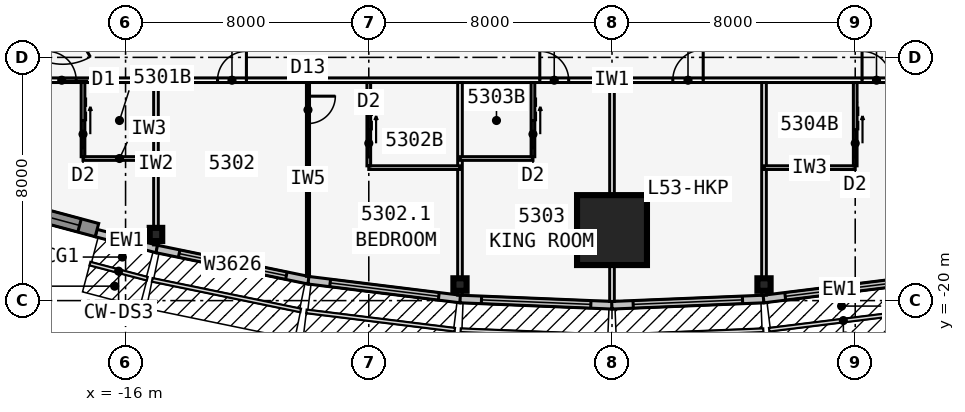
"""IFC4 building model, lengths in metres.
Left out: names, types, materials, properties, quantities, classifications, styles, units other than length and angle.
Written with IfcOpenShell. Run it as: python <this file> out.ifc"""

import sys

from ifc_helpers import new_model, si_unit, direction, frame, frame_2d, origin, origin_2d, place, context, subcontext, project, spatial, rectangle, i_section, extrude, element, fill, save


model = new_model("IFC4")
c1 = context("Model", 3, precision=1e-05, world=origin(), true_north=direction((0.0, 1.0)))
c2 = subcontext(c1, "Body", "Model", "MODEL_VIEW")
j1 = project(units=[si_unit("LENGTHUNIT", "METRE"), si_unit("PLANEANGLEUNIT", "RADIAN")], contexts=[c1])
p1 = place(None, origin())
s1 = spatial("IfcSite", under=j1, at=p1, CompositionType="ELEMENT")
p2 = place(p1, origin())
s2 = spatial("IfcBuilding", under=s1, at=p2, CompositionType="ELEMENT")
p3 = place(p2, frame((0.0, 0.0, 200.9)))
s3 = spatial("IfcBuildingStorey", under=s2, at=p3, CompositionType="ELEMENT", Elevation=200.9)
p4 = place(p3, frame((-16.5, -9.526, 0.0), z_axis=(0.0, 0.0, 1.0), x_axis=(-0.866031398331, -0.499989616998, 0.0)))
e1 = element("IfcWall", 1, at=p4, inside=s3, PredefinedType="SHEAR", context=c2, shape_type="SweptSolid", body=[
    extrude(rectangle(XDim=4.746, YDim=0.9, at=frame_2d((2.373, 0.0))), origin(), (0.0, 0.0, 1.0), 3.6),
])
p5 = place(p4, frame((1.8, 0.0, 0.0)))
e2 = element("IfcOpeningElement", 2, at=p5, cuts=e1, PredefinedType="OPENING", context=c2, shape_type="SweptSolid", body=[
    extrude(rectangle(XDim=1.8, YDim=2.13, at=frame_2d((0.9, 1.065))), frame((0.0, 0.46, 0.0), z_axis=(0.0, -1.0, 0.0), x_axis=(1.0, 0.0, 0.0)), (0.0, 0.0, 1.0), 0.92),
])
for number, where, z_axis, x_axis in (
    (3, (-15.0, -17.825, 0.0), (0.0, 0.0, 1.0), (1.0, 0.0, 0.0)),
    (4, (-5.0, -19.472, 0.0), (0.0, 0.0, 1.0), (0.0, -1.0, 0.0)),
    (5, (5.0, -19.472, 0.0), (0.0, 0.0, 1.0), (0.0, -1.0, 0.0)),
):
    element("IfcColumn", number, at=place(p3, frame(where, z_axis=z_axis, x_axis=x_axis)), inside=s3, PredefinedType="COLUMN", context=c2, shape_type="SweptSolid", body=[
        extrude(i_section(OverallWidth=0.411, OverallDepth=0.434, WebThickness=0.036, FlangeThickness=0.057, at=origin_2d()), origin(), (0.0, 0.0, 1.0), 3.6),
    ])
p6 = place(p3, frame((0.0, -17.68, 0.0), z_axis=(0.0, 0.0, 1.0), x_axis=(0.0, -1.0, 0.0)))
e6 = element("IfcColumn", 6, at=p6, inside=s3, PredefinedType="COLUMN", context=c2, shape_type="SweptSolid", body=[
    extrude(rectangle(XDim=2.3, YDim=2.3, at=origin_2d()), origin(), (0.0, 0.0, 1.0), 3.6),
])
p7 = place(p3, frame((-16.968, -17.777, 0.0), z_axis=(0.0, 0.0, 1.0), x_axis=(0.967010286052, -0.254737328772, 0.0)))
e7 = element("IfcWall", 7, at=p7, inside=s3, PredefinedType="STANDARD", context=c2, shape_type="SweptSolid", body=[
    extrude(rectangle(XDim=2.068, YDim=0.25, at=frame_2d((1.034, 0.0))), origin(), (0.0, 0.0, 1.0), 3.435),
])
p8 = place(p3, frame((-14.975, -18.302, 0.0), z_axis=(0.0, 0.0, 1.0), x_axis=(0.979461488189, -0.201631329795, 0.0)))
e8 = element("IfcWall", 8, at=p8, inside=s3, PredefinedType="STANDARD", context=c2, shape_type="SweptSolid", body=[
    extrude(rectangle(XDim=5.105, YDim=0.25, at=frame_2d((2.552, 0.0))), origin(), (0.0, 0.0, 1.0), 3.435),
])
p9 = place(p8, frame((0.752, 0.0, 0.45)))
e9 = element("IfcOpeningElement", 9, at=p9, cuts=e8, PredefinedType="OPENING", context=c2, shape_type="SweptSolid", body=[
    extrude(rectangle(XDim=3.6, YDim=2.6, at=frame_2d((1.8, 1.3))), frame((0.0, 0.135, 0.0), z_axis=(0.0, -1.0, 0.0), x_axis=(1.0, 0.0, 0.0)), (0.0, 0.0, 1.0), 0.27),
])
p10 = place(p3, frame((-9.985, -19.33, 0.0), z_axis=(0.0, 0.0, 1.0), x_axis=(0.992449874964, -0.12265090984, 0.0)))
e10 = element("IfcWall", 10, at=p10, inside=s3, PredefinedType="STANDARD", context=c2, shape_type="SweptSolid", body=[
    extrude(rectangle(XDim=5.038, YDim=0.25, at=frame_2d((2.519, 0.0))), origin(), (0.0, 0.0, 1.0), 3.435),
])
p11 = place(p10, frame((0.719, 0.0, 0.45)))
e11 = element("IfcOpeningElement", 11, at=p11, cuts=e10, PredefinedType="OPENING", context=c2, shape_type="SweptSolid", body=[
    extrude(rectangle(XDim=3.6, YDim=2.6, at=frame_2d((1.8, 1.3))), frame((0.0, 0.135, 0.0), z_axis=(0.0, -1.0, 0.0), x_axis=(1.0, 0.0, 0.0)), (0.0, 0.0, 1.0), 0.27),
])
p12 = place(p3, frame((-4.995, -19.947, 0.0), z_axis=(0.0, 0.0, 1.0), x_axis=(0.999151909423, -0.041175986892, 0.0)))
e12 = element("IfcWall", 12, at=p12, inside=s3, PredefinedType="STANDARD", context=c2, shape_type="SweptSolid", body=[
    extrude(rectangle(XDim=5.004, YDim=0.25, at=frame_2d((2.502, 0.0))), origin(), (0.0, 0.0, 1.0), 3.435),
])
p13 = place(p12, frame((0.702, 0.0, 0.45)))
e13 = element("IfcOpeningElement", 13, at=p13, cuts=e12, PredefinedType="OPENING", context=c2, shape_type="SweptSolid", body=[
    extrude(rectangle(XDim=3.6, YDim=2.6, at=frame_2d((1.8, 1.3))), frame((0.0, 0.135, 0.0), z_axis=(0.0, -1.0, 0.0), x_axis=(1.0, 0.0, 0.0)), (0.0, 0.0, 1.0), 0.27),
])
p14 = place(p3, frame((-0.005, -20.153, 0.0), z_axis=(0.0, 0.0, 1.0), x_axis=(0.999151909423, 0.041175986892, 0.0)))
e14 = element("IfcWall", 14, at=p14, inside=s3, PredefinedType="STANDARD", context=c2, shape_type="SweptSolid", body=[
    extrude(rectangle(XDim=5.004, YDim=0.25, at=frame_2d((2.502, 0.0))), origin(), (0.0, 0.0, 1.0), 3.435),
])
p15 = place(p14, frame((0.702, 0.0, 0.45)))
e15 = element("IfcOpeningElement", 15, at=p15, cuts=e14, PredefinedType="OPENING", context=c2, shape_type="SweptSolid", body=[
    extrude(rectangle(XDim=3.6, YDim=2.6, at=frame_2d((1.8, 1.3))), frame((0.0, 0.135, 0.0), z_axis=(0.0, -1.0, 0.0), x_axis=(1.0, 0.0, 0.0)), (0.0, 0.0, 1.0), 0.27),
])
p16 = place(p3, frame((4.985, -19.948, 0.0), z_axis=(0.0, 0.0, 1.0), x_axis=(0.992449874964, 0.12265090984, 0.0)))
e16 = element("IfcWall", 16, at=p16, inside=s3, PredefinedType="STANDARD", context=c2, shape_type="SweptSolid", body=[
    extrude(rectangle(XDim=5.038, YDim=0.25, at=frame_2d((2.519, 0.0))), origin(), (0.0, 0.0, 1.0), 3.435),
])
p17 = place(p16, frame((0.719, 0.0, 0.45)))
e17 = element("IfcOpeningElement", 17, at=p17, cuts=e16, PredefinedType="OPENING", context=c2, shape_type="SweptSolid", body=[
    extrude(rectangle(XDim=3.6, YDim=2.6, at=frame_2d((1.8, 1.3))), frame((0.0, 0.135, 0.0), z_axis=(0.0, -1.0, 0.0), x_axis=(1.0, 0.0, 0.0)), (0.0, 0.0, 1.0), 0.27),
])
p18 = place(p3, frame((-20.983, -16.598, 0.0), z_axis=(0.0, 0.0, 1.0), x_axis=(0.965920442324, -0.258839137498, 0.0)))
e18 = element("IfcWall", 18, at=p18, inside=s3, PredefinedType="SOLIDWALL", context=c2, shape_type="SweptSolid", body=[
    extrude(rectangle(XDim=4.184, YDim=0.45, at=frame_2d((2.092, 0.0))), origin(), (0.0, 0.0, 1.0), 3.435),
])
p19 = place(p18, frame((0.592, 0.0, 0.45)))
e19 = element("IfcOpeningElement", 19, at=p19, cuts=e18, PredefinedType="OPENING", context=c2, shape_type="SweptSolid", body=[
    extrude(rectangle(XDim=3.0, YDim=2.6, at=frame_2d((1.5, 1.3))), frame((0.0, 0.235, 0.0), z_axis=(0.0, -1.0, 0.0), x_axis=(1.0, 0.0, 0.0)), (0.0, 0.0, 1.0), 0.47),
])
p20 = place(p3, frame((-21.086, -12.751, 0.0), z_axis=(0.0, 0.0, 1.0), x_axis=(1.0, 0.0, 0.0)))
e20 = element("IfcWall", 20, at=p20, inside=s3, PredefinedType="PARTITIONING", context=c2, shape_type="SweptSolid", body=[
    extrude(rectangle(XDim=42.172, YDim=0.15, at=frame_2d((21.086, 0.0))), origin(), (0.0, 0.0, 1.0), 3.435),
])
p21 = place(p20, frame((2.511, 0.0, 0.0)))
e21 = element("IfcOpeningElement", 21, at=p21, cuts=e20, PredefinedType="OPENING", context=c2, shape_type="SweptSolid", body=[
    extrude(rectangle(XDim=0.95, YDim=2.13, at=frame_2d((0.475, 1.065))), frame((0.0, 0.085, 0.0), z_axis=(0.0, -1.0, 0.0), x_axis=(1.0, 0.0, 0.0)), (0.0, 0.0, 1.0), 0.17),
])
p22 = place(p20, frame((8.111, 0.0, 0.0)))
e22 = element("IfcOpeningElement", 22, at=p22, cuts=e20, PredefinedType="OPENING", context=c2, shape_type="SweptSolid", body=[
    extrude(rectangle(XDim=0.95, YDim=2.13, at=frame_2d((0.475, 1.065))), frame((0.0, 0.085, 0.0), z_axis=(0.0, -1.0, 0.0), x_axis=(1.0, 0.0, 0.0)), (0.0, 0.0, 1.0), 0.17),
])
p23 = place(p20, frame((18.711, 0.0, 0.0)))
e23 = element("IfcOpeningElement", 23, at=p23, cuts=e20, PredefinedType="OPENING", context=c2, shape_type="SweptSolid", body=[
    extrude(rectangle(XDim=0.95, YDim=2.13, at=frame_2d((0.475, 1.065))), frame((0.0, 0.085, 0.0), z_axis=(0.0, -1.0, 0.0), x_axis=(1.0, 0.0, 0.0)), (0.0, 0.0, 1.0), 0.17),
])
p24 = place(p20, frame((23.086, 0.0, 0.0)))
e24 = element("IfcOpeningElement", 24, at=p24, cuts=e20, PredefinedType="OPENING", context=c2, shape_type="SweptSolid", body=[
    extrude(rectangle(XDim=1.0, YDim=2.13, at=frame_2d((0.5, 1.065))), frame((0.0, 0.085, 0.0), z_axis=(0.0, -1.0, 0.0), x_axis=(1.0, 0.0, 0.0)), (0.0, 0.0, 1.0), 0.17),
])
p25 = place(p20, frame((29.311, 0.0, 0.0)))
e25 = element("IfcOpeningElement", 25, at=p25, cuts=e20, PredefinedType="OPENING", context=c2, shape_type="SweptSolid", body=[
    extrude(rectangle(XDim=0.95, YDim=2.13, at=frame_2d((0.475, 1.065))), frame((0.0, 0.085, 0.0), z_axis=(0.0, -1.0, 0.0), x_axis=(1.0, 0.0, 0.0)), (0.0, 0.0, 1.0), 0.17),
])
p26 = place(p20, frame((38.711, 0.0, 0.0)))
e26 = element("IfcOpeningElement", 26, at=p26, cuts=e20, PredefinedType="OPENING", context=c2, shape_type="SweptSolid", body=[
    extrude(rectangle(XDim=0.95, YDim=2.13, at=frame_2d((0.475, 1.065))), frame((0.0, 0.085, 0.0), z_axis=(0.0, -1.0, 0.0), x_axis=(1.0, 0.0, 0.0)), (0.0, 0.0, 1.0), 0.17),
])
p27 = place(p3, frame((-15.0, -12.826, 0.0), z_axis=(0.0, 0.0, 1.0), x_axis=(0.0, -1.0, 0.0)))
e27 = element("IfcWall", 27, at=p27, inside=s3, PredefinedType="PARTITIONING", context=c2, shape_type="SweptSolid", body=[
    extrude(rectangle(XDim=5.34, YDim=0.15, at=frame_2d((2.67, 0.0))), origin(), (0.0, 0.0, 1.0), 2.589),
])
p28 = place(p3, frame((-10.0, -12.826, 0.0), z_axis=(0.0, 0.0, 1.0), x_axis=(0.0, -1.0, 0.0)))
e28 = element("IfcWall", 28, at=p28, inside=s3, PredefinedType="PARTITIONING", context=c2, shape_type="SweptSolid", body=[
    extrude(rectangle(XDim=6.373, YDim=0.1, at=frame_2d((3.187, 0.0))), origin(), (0.0, 0.0, 1.0), 2.589),
])
p29 = place(p28, frame((0.45, 0.0, 0.0)))
e29 = element("IfcOpeningElement", 29, at=p29, cuts=e28, PredefinedType="OPENING", context=c2, shape_type="SweptSolid", body=[
    extrude(rectangle(XDim=0.9, YDim=2.13, at=frame_2d((0.45, 1.065))), frame((0.0, 0.06, 0.0), z_axis=(0.0, -1.0, 0.0), x_axis=(1.0, 0.0, 0.0)), (0.0, 0.0, 1.0), 0.12),
])
p30 = place(p3, frame((-5.0, -12.826, 0.0), z_axis=(0.0, 0.0, 1.0), x_axis=(0.0, -1.0, 0.0)))
e30 = element("IfcWall", 30, at=p30, inside=s3, PredefinedType="PARTITIONING", context=c2, shape_type="SweptSolid", body=[
    extrude(rectangle(XDim=6.994, YDim=0.15, at=frame_2d((3.497, 0.0))), origin(), (0.0, 0.0, 1.0), 2.589),
])
p31 = place(p3, frame((0.0, -12.826, 0.0), z_axis=(0.0, 0.0, 1.0), x_axis=(0.0, -1.0, 0.0)))
e31 = element("IfcWall", 31, at=p31, inside=s3, PredefinedType="PARTITIONING", context=c2, shape_type="SweptSolid", body=[
    extrude(rectangle(XDim=7.201, YDim=0.15, at=frame_2d((3.601, 0.0))), origin(), (0.0, 0.0, 1.0), 2.589),
])
p32 = place(p3, frame((5.0, -12.826, 0.0), z_axis=(0.0, 0.0, 1.0), x_axis=(0.0, -1.0, 0.0)))
e32 = element("IfcWall", 32, at=p32, inside=s3, PredefinedType="PARTITIONING", context=c2, shape_type="SweptSolid", body=[
    extrude(rectangle(XDim=6.994, YDim=0.15, at=frame_2d((3.497, 0.0))), origin(), (0.0, 0.0, 1.0), 2.589),
])
p33 = place(p3, frame((-17.4, -15.326, 0.0), z_axis=(0.0, 0.0, 1.0), x_axis=(1.0, 0.0, 0.0)))
e33 = element("IfcWall", 33, at=p33, inside=s3, PredefinedType="PLUMBINGWALL", context=c2, shape_type="SweptSolid", body=[
    extrude(rectangle(XDim=2.4, YDim=0.12, at=frame_2d((1.2, 0.0))), origin(), (0.0, 0.0, 1.0), 3.435),
])
p34 = place(p3, frame((-17.4, -12.826, 0.0), z_axis=(0.0, 0.0, 1.0), x_axis=(0.0, -1.0, 0.0)))
e34 = element("IfcWall", 34, at=p34, inside=s3, PredefinedType="PLUMBINGWALL", context=c2, shape_type="SweptSolid", body=[
    extrude(rectangle(XDim=2.44, YDim=0.12, at=frame_2d((1.22, 0.0))), origin(), (0.0, 0.0, 1.0), 3.435),
])
p35 = place(p34, frame((1.25, 0.0, 0.0)))
e35 = element("IfcOpeningElement", 35, at=p35, cuts=e34, PredefinedType="OPENING", context=c2, shape_type="SweptSolid", body=[
    extrude(rectangle(XDim=0.9, YDim=2.13, at=frame_2d((0.45, 1.065))), frame((0.0, 0.07, 0.0), z_axis=(0.0, -1.0, 0.0), x_axis=(1.0, 0.0, 0.0)), (0.0, 0.0, 1.0), 0.14),
])
p36 = place(p3, frame((-8.0, -15.626, 0.0), z_axis=(0.0, 0.0, 1.0), x_axis=(1.0, 0.0, 0.0)))
e36 = element("IfcWall", 36, at=p36, inside=s3, PredefinedType="PLUMBINGWALL", context=c2, shape_type="SweptSolid", body=[
    extrude(rectangle(XDim=3.0, YDim=0.12, at=frame_2d((1.5, 0.0))), origin(), (0.0, 0.0, 1.0), 3.435),
])
p37 = place(p3, frame((-8.0, -12.826, 0.0), z_axis=(0.0, 0.0, 1.0), x_axis=(0.0, -1.0, 0.0)))
e37 = element("IfcWall", 37, at=p37, inside=s3, PredefinedType="PLUMBINGWALL", context=c2, shape_type="SweptSolid", body=[
    extrude(rectangle(XDim=2.74, YDim=0.12, at=frame_2d((1.37, 0.0))), origin(), (0.0, 0.0, 1.0), 3.435),
])
p38 = place(p37, frame((1.55, 0.0, 0.0)))
e38 = element("IfcOpeningElement", 38, at=p38, cuts=e37, PredefinedType="OPENING", context=c2, shape_type="SweptSolid", body=[
    extrude(rectangle(XDim=0.9, YDim=2.13, at=frame_2d((0.45, 1.065))), frame((0.0, 0.07, 0.0), z_axis=(0.0, -1.0, 0.0), x_axis=(1.0, 0.0, 0.0)), (0.0, 0.0, 1.0), 0.14),
])
p39 = place(p3, frame((-5.0, -15.326, 0.0), z_axis=(0.0, 0.0, 1.0), x_axis=(1.0, 0.0, 0.0)))
e39 = element("IfcWall", 39, at=p39, inside=s3, PredefinedType="PLUMBINGWALL", context=c2, shape_type="SweptSolid", body=[
    extrude(rectangle(XDim=2.4, YDim=0.12, at=frame_2d((1.2, 0.0))), origin(), (0.0, 0.0, 1.0), 3.435),
])
p40 = place(p3, frame((-2.6, -12.826, 0.0), z_axis=(0.0, 0.0, 1.0), x_axis=(0.0, -1.0, 0.0)))
e40 = element("IfcWall", 40, at=p40, inside=s3, PredefinedType="PLUMBINGWALL", context=c2, shape_type="SweptSolid", body=[
    extrude(rectangle(XDim=2.44, YDim=0.12, at=frame_2d((1.22, 0.0))), origin(), (0.0, 0.0, 1.0), 3.435),
])
p41 = place(p40, frame((1.25, 0.0, 0.0)))
e41 = element("IfcOpeningElement", 41, at=p41, cuts=e40, PredefinedType="OPENING", context=c2, shape_type="SweptSolid", body=[
    extrude(rectangle(XDim=0.9, YDim=2.13, at=frame_2d((0.45, 1.065))), frame((0.0, 0.07, 0.0), z_axis=(0.0, -1.0, 0.0), x_axis=(1.0, 0.0, 0.0)), (0.0, 0.0, 1.0), 0.14),
])
p42 = place(p3, frame((5.0, -15.626, 0.0), z_axis=(0.0, 0.0, 1.0), x_axis=(1.0, 0.0, 0.0)))
e42 = element("IfcWall", 42, at=p42, inside=s3, PredefinedType="PLUMBINGWALL", context=c2, shape_type="SweptSolid", body=[
    extrude(rectangle(XDim=3.0, YDim=0.12, at=frame_2d((1.5, 0.0))), origin(), (0.0, 0.0, 1.0), 3.435),
])
p43 = place(p3, frame((8.0, -12.826, 0.0), z_axis=(0.0, 0.0, 1.0), x_axis=(0.0, -1.0, 0.0)))
e43 = element("IfcWall", 43, at=p43, inside=s3, PredefinedType="PLUMBINGWALL", context=c2, shape_type="SweptSolid", body=[
    extrude(rectangle(XDim=2.74, YDim=0.12, at=frame_2d((1.37, 0.0))), origin(), (0.0, 0.0, 1.0), 3.435),
])
p44 = place(p43, frame((1.55, 0.0, 0.0)))
e44 = element("IfcOpeningElement", 44, at=p44, cuts=e43, PredefinedType="OPENING", context=c2, shape_type="SweptSolid", body=[
    extrude(rectangle(XDim=0.9, YDim=2.13, at=frame_2d((0.45, 1.065))), frame((0.0, 0.07, 0.0), z_axis=(0.0, -1.0, 0.0), x_axis=(1.0, 0.0, 0.0)), (0.0, 0.0, 1.0), 0.14),
])
p45 = place(p9, origin())
e45 = element("IfcWindow", 45, at=p45, inside=s3, PartitioningType="SINGLE_PANEL", PredefinedType="WINDOW", context=c2, shape_type="SweptSolid", body=[
    extrude(rectangle(XDim=3.6, YDim=2.6, at=frame_2d((1.8, 1.3))), frame((0.0, 0.03, 0.0), z_axis=(0.0, -1.0, 0.0), x_axis=(1.0, 0.0, 0.0)), (0.0, 0.0, 1.0), 0.06),
])
fill(e9, e45)
p46 = place(p11, origin())
e46 = element("IfcWindow", 46, at=p46, inside=s3, PartitioningType="SINGLE_PANEL", PredefinedType="WINDOW", context=c2, shape_type="SweptSolid", body=[
    extrude(rectangle(XDim=3.6, YDim=2.6, at=frame_2d((1.8, 1.3))), frame((0.0, 0.03, 0.0), z_axis=(0.0, -1.0, 0.0), x_axis=(1.0, 0.0, 0.0)), (0.0, 0.0, 1.0), 0.06),
])
fill(e11, e46)
p47 = place(p13, origin())
e47 = element("IfcWindow", 47, at=p47, inside=s3, PartitioningType="SINGLE_PANEL", PredefinedType="WINDOW", context=c2, shape_type="SweptSolid", body=[
    extrude(rectangle(XDim=3.6, YDim=2.6, at=frame_2d((1.8, 1.3))), frame((0.0, 0.03, 0.0), z_axis=(0.0, -1.0, 0.0), x_axis=(1.0, 0.0, 0.0)), (0.0, 0.0, 1.0), 0.06),
])
fill(e13, e47)
p48 = place(p15, origin())
e48 = element("IfcWindow", 48, at=p48, inside=s3, PartitioningType="SINGLE_PANEL", PredefinedType="WINDOW", context=c2, shape_type="SweptSolid", body=[
    extrude(rectangle(XDim=3.6, YDim=2.6, at=frame_2d((1.8, 1.3))), frame((0.0, 0.03, 0.0), z_axis=(0.0, -1.0, 0.0), x_axis=(1.0, 0.0, 0.0)), (0.0, 0.0, 1.0), 0.06),
])
fill(e15, e48)
p49 = place(p17, origin())
e49 = element("IfcWindow", 49, at=p49, inside=s3, PartitioningType="SINGLE_PANEL", PredefinedType="WINDOW", context=c2, shape_type="SweptSolid", body=[
    extrude(rectangle(XDim=3.6, YDim=2.6, at=frame_2d((1.8, 1.3))), frame((0.0, 0.03, 0.0), z_axis=(0.0, -1.0, 0.0), x_axis=(1.0, 0.0, 0.0)), (0.0, 0.0, 1.0), 0.06),
])
fill(e17, e49)
p50 = place(p19, origin())
e50 = element("IfcWindow", 50, at=p50, inside=s3, PartitioningType="SINGLE_PANEL", PredefinedType="WINDOW", context=c2, shape_type="SweptSolid", body=[
    extrude(rectangle(XDim=3.0, YDim=2.6, at=frame_2d((1.5, 1.3))), frame((0.0, 0.03, 0.0), z_axis=(0.0, -1.0, 0.0), x_axis=(1.0, 0.0, 0.0)), (0.0, 0.0, 1.0), 0.06),
])
fill(e19, e50)
p51 = place(p29, origin())
e51 = element("IfcDoor", 51, at=p51, inside=s3, OperationType="SINGLE_SWING_LEFT", PredefinedType="DOOR", context=c2, shape_type="SweptSolid", body=[
    extrude(rectangle(XDim=0.9, YDim=2.13, at=frame_2d((0.45, 1.065))), frame((0.0, 0.025, 0.0), z_axis=(0.0, -1.0, 0.0), x_axis=(1.0, 0.0, 0.0)), (0.0, 0.0, 1.0), 0.05),
])
fill(e29, e51)
p52 = place(p35, origin())
e52 = element("IfcDoor", 52, at=p52, inside=s3, OperationType="SLIDING_TO_LEFT", PredefinedType="DOOR", context=c2, shape_type="SweptSolid", body=[
    extrude(rectangle(XDim=0.9, YDim=2.13, at=frame_2d((0.45, 1.065))), frame((0.0, 0.025, 0.0), z_axis=(0.0, -1.0, 0.0), x_axis=(1.0, 0.0, 0.0)), (0.0, 0.0, 1.0), 0.05),
])
fill(e35, e52)
p53 = place(p21, origin())
e53 = element("IfcDoor", 53, at=p53, inside=s3, OperationType="SINGLE_SWING_LEFT", PredefinedType="DOOR", context=c2, shape_type="SweptSolid", body=[
    extrude(rectangle(XDim=0.95, YDim=2.13, at=frame_2d((0.475, 1.065))), frame((0.0, 0.025, 0.0), z_axis=(0.0, -1.0, 0.0), x_axis=(1.0, 0.0, 0.0)), (0.0, 0.0, 1.0), 0.05),
])
fill(e21, e53)
p54 = place(p22, origin())
e54 = element("IfcDoor", 54, at=p54, inside=s3, OperationType="SINGLE_SWING_RIGHT", PredefinedType="DOOR", context=c2, shape_type="SweptSolid", body=[
    extrude(rectangle(XDim=0.95, YDim=2.13, at=frame_2d((0.475, 1.065))), frame((0.0, 0.025, 0.0), z_axis=(0.0, -1.0, 0.0), x_axis=(1.0, 0.0, 0.0)), (0.0, 0.0, 1.0), 0.05),
])
fill(e22, e54)
p55 = place(p38, origin())
e55 = element("IfcDoor", 55, at=p55, inside=s3, OperationType="SLIDING_TO_LEFT", PredefinedType="DOOR", context=c2, shape_type="SweptSolid", body=[
    extrude(rectangle(XDim=0.9, YDim=2.13, at=frame_2d((0.45, 1.065))), frame((0.0, 0.025, 0.0), z_axis=(0.0, -1.0, 0.0), x_axis=(1.0, 0.0, 0.0)), (0.0, 0.0, 1.0), 0.05),
])
fill(e38, e55)
p56 = place(p41, origin())
e56 = element("IfcDoor", 56, at=p56, inside=s3, OperationType="SLIDING_TO_LEFT", PredefinedType="DOOR", context=c2, shape_type="SweptSolid", body=[
    extrude(rectangle(XDim=0.9, YDim=2.13, at=frame_2d((0.45, 1.065))), frame((0.0, 0.025, 0.0), z_axis=(0.0, -1.0, 0.0), x_axis=(1.0, 0.0, 0.0)), (0.0, 0.0, 1.0), 0.05),
])
fill(e41, e56)
p57 = place(p23, origin())
e57 = element("IfcDoor", 57, at=p57, inside=s3, OperationType="SINGLE_SWING_LEFT", PredefinedType="DOOR", context=c2, shape_type="SweptSolid", body=[
    extrude(rectangle(XDim=0.95, YDim=2.13, at=frame_2d((0.475, 1.065))), frame((0.0, 0.025, 0.0), z_axis=(0.0, -1.0, 0.0), x_axis=(1.0, 0.0, 0.0)), (0.0, 0.0, 1.0), 0.05),
])
fill(e23, e57)
p58 = place(p24, origin())
e58 = element("IfcDoor", 58, at=p58, inside=s3, OperationType="SINGLE_SWING_RIGHT", PredefinedType="DOOR", context=c2, shape_type="SweptSolid", body=[
    extrude(rectangle(XDim=1.0, YDim=2.13, at=frame_2d((0.5, 1.065))), frame((0.0, 0.025, 0.0), z_axis=(0.0, -1.0, 0.0), x_axis=(1.0, 0.0, 0.0)), (0.0, 0.0, 1.0), 0.05),
])
fill(e24, e58)
p59 = place(p44, origin())
e59 = element("IfcDoor", 59, at=p59, inside=s3, OperationType="SLIDING_TO_LEFT", PredefinedType="DOOR", context=c2, shape_type="SweptSolid", body=[
    extrude(rectangle(XDim=0.9, YDim=2.13, at=frame_2d((0.45, 1.065))), frame((0.0, 0.025, 0.0), z_axis=(0.0, -1.0, 0.0), x_axis=(1.0, 0.0, 0.0)), (0.0, 0.0, 1.0), 0.05),
])
fill(e44, e59)
p60 = place(p25, origin())
e60 = element("IfcDoor", 60, at=p60, inside=s3, OperationType="SINGLE_SWING_LEFT", PredefinedType="DOOR", context=c2, shape_type="SweptSolid", body=[
    extrude(rectangle(XDim=0.95, YDim=2.13, at=frame_2d((0.475, 1.065))), frame((0.0, 0.025, 0.0), z_axis=(0.0, -1.0, 0.0), x_axis=(1.0, 0.0, 0.0)), (0.0, 0.0, 1.0), 0.05),
])
fill(e25, e60)
save(model, sys.argv[1])
